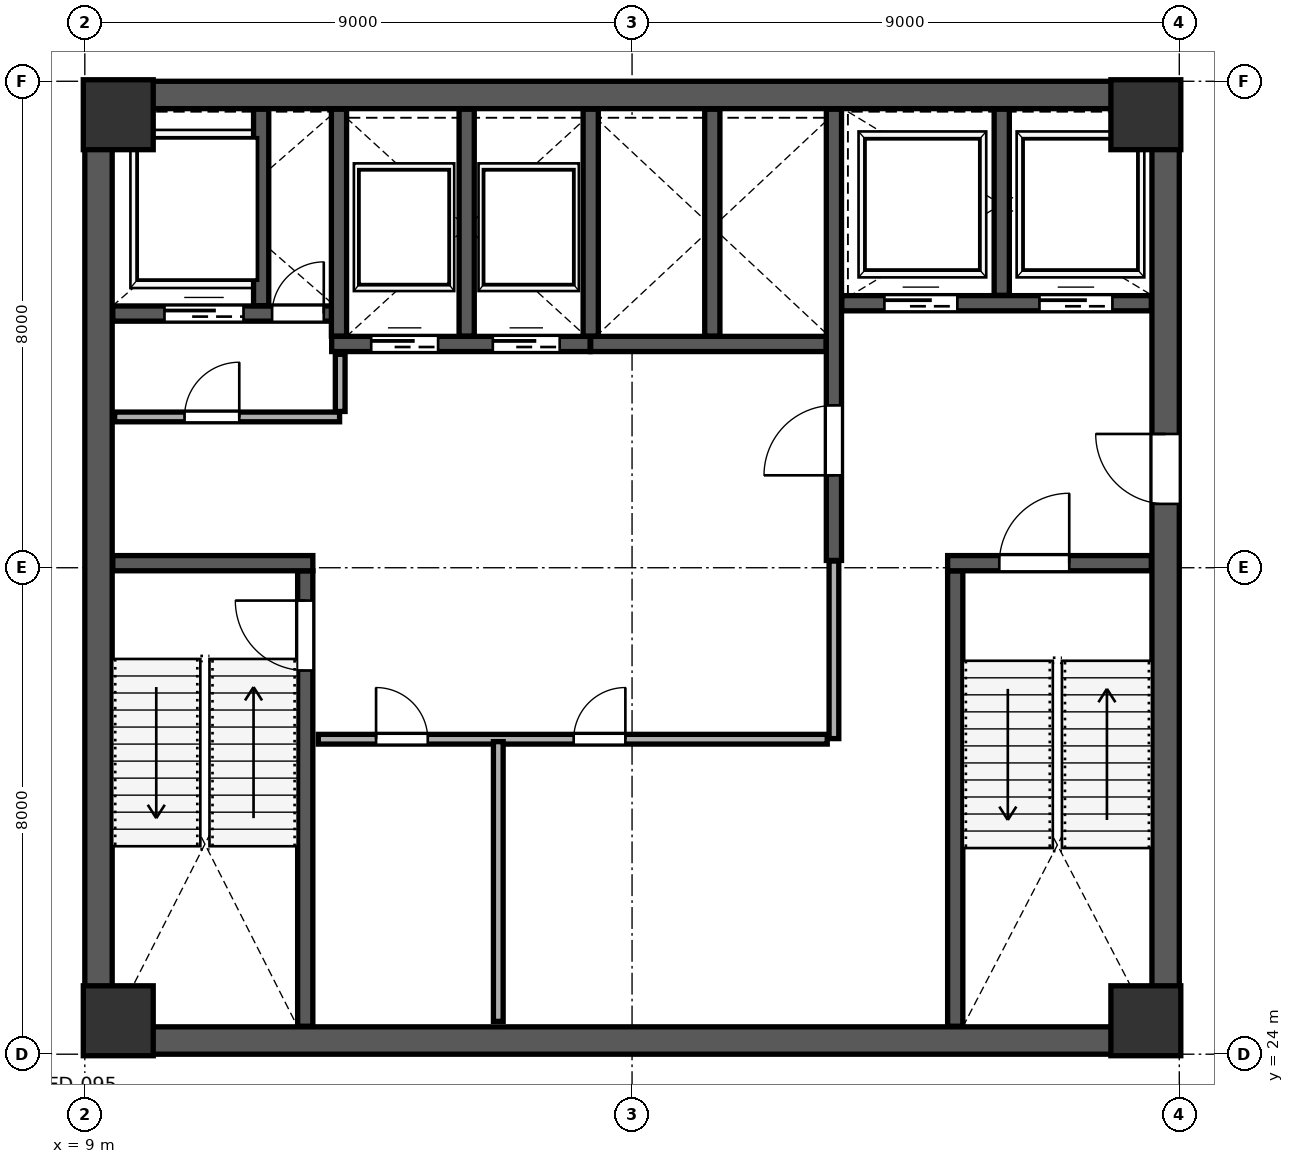
"""IFC4 building model, lengths in metres.
Left out: names, types, materials, properties, quantities, classifications, styles, units other than length and angle.
Written with IfcOpenShell. Run it as: python <this file> out.ifc"""

import sys

from ifc_helpers import new_model, si_unit, direction, frame, frame_2d, origin, origin_2d, place, context, subcontext, project, spatial, rectangle, extrude, source, transform, mapped, element, fill, save


model = new_model("IFC4")
c1 = context("Model", 3, precision=1e-05, world=origin(), true_north=direction((0.0, 1.0)))
c2 = subcontext(c1, "Body", "Model", "MODEL_VIEW")
j1 = project(units=[si_unit("LENGTHUNIT", "METRE"), si_unit("PLANEANGLEUNIT", "RADIAN")], contexts=[c1])
p1 = place(None, origin())
s1 = spatial("IfcSite", under=j1, at=p1, CompositionType="ELEMENT")
p2 = place(p1, origin())
s2 = spatial("IfcBuilding", under=s1, at=p2, CompositionType="ELEMENT")
p3 = place(p2, frame((0.0, 0.0, 154.0)))
s3 = spatial("IfcBuildingStorey", under=s2, at=p3, CompositionType="ELEMENT", Elevation=154.0)
m1 = source(origin(), c2, "Body", "SweptSolid", [
    extrude(rectangle(XDim=1.15, YDim=1.15, at=origin_2d()), origin(), (0.0, 0.0, 1.0), 4.198),
])
for number, where, z_axis, x_axis in (
    (1, (9.55, 24.55, 0.001), (0.0, 0.0, 1.0), (1.0, 0.0, 0.0)),
    (2, (26.45, 24.55, 0.001), (0.0, 0.0, 1.0), (1.0, 0.0, 0.0)),
    (3, (9.55, 39.45, 0.001), (0.0, 0.0, 1.0), (1.0, 0.0, 0.0)),
    (4, (26.45, 39.45, 0.001), (0.0, 0.0, 1.0), (1.0, 0.0, 0.0)),
):
    element("IfcColumn", number, at=place(p3, frame(where, z_axis=z_axis, x_axis=x_axis)), inside=s3, PredefinedType="COLUMN", context=c2, shape_type="MappedRepresentation", body=[
        mapped(m1, transform((0.0, 0.0, 0.0), scale=1.0)),
    ])
p4 = place(p3, frame((9.225, 24.45, 0.0), z_axis=(0.0, 0.0, 1.0), x_axis=(0.0, 1.0, 0.0)))
e5 = element("IfcWall", 5, at=p4, inside=s3, PredefinedType="SHEAR", context=c2, shape_type="SweptSolid", body=[
    extrude(rectangle(XDim=15.1, YDim=0.45, at=frame_2d((7.55, 0.0))), origin(), (0.0, 0.0, 1.0), 3.96),
])
p5 = place(p3, frame((26.775, 24.45, 0.0), z_axis=(0.0, 0.0, 1.0), x_axis=(0.0, 1.0, 0.0)))
e6 = element("IfcWall", 6, at=p5, inside=s3, PredefinedType="SHEAR", context=c2, shape_type="SweptSolid", body=[
    extrude(rectangle(XDim=15.1, YDim=0.45, at=frame_2d((7.55, 0.0))), origin(), (0.0, 0.0, 1.0), 3.96),
])
p6 = place(p5, frame((8.6, 0.0, 0.0)))
e7 = element("IfcOpeningElement", 7, at=p6, cuts=e6, PredefinedType="OPENING", context=c2, shape_type="SweptSolid", body=[
    extrude(rectangle(XDim=1.15, YDim=2.2, at=frame_2d((0.575, 1.1))), frame((0.0, 0.235, 0.0), z_axis=(0.0, -1.0, 0.0), x_axis=(1.0, 0.0, 0.0)), (0.0, 0.0, 1.0), 0.47),
])
for number, where, z_axis, x_axis in (
    (8, (9.0, 24.225, 0.0), (0.0, 0.0, 1.0), (1.0, 0.0, 0.0)),
    (9, (9.0, 39.775, 0.0), (0.0, 0.0, 1.0), (1.0, 0.0, 0.0)),
):
    element("IfcWall", number, at=place(p3, frame(where, z_axis=z_axis, x_axis=x_axis)), inside=s3, PredefinedType="SHEAR", context=c2, shape_type="SweptSolid", body=[
        extrude(rectangle(XDim=18.0, YDim=0.45, at=frame_2d((9.0, 0.0))), origin(), (0.0, 0.0, 1.0), 3.96),
    ])
p7 = place(p3, frame((12.625, 24.46, 0.0), z_axis=(0.0, 0.0, 1.0), x_axis=(0.0, 1.0, 0.0)))
e10 = element("IfcWall", 10, at=p7, inside=s3, PredefinedType="SHEAR", context=c2, shape_type="SweptSolid", body=[
    extrude(rectangle(XDim=7.49, YDim=0.25, at=frame_2d((3.745, 0.0))), origin(), (0.0, 0.0, 1.0), 3.96),
])
p8 = place(p7, frame((5.85, 0.0, 0.0)))
e11 = element("IfcOpeningElement", 11, at=p8, cuts=e10, PredefinedType="OPENING", context=c2, shape_type="SweptSolid", body=[
    extrude(rectangle(XDim=1.15, YDim=2.2, at=frame_2d((0.575, 1.1))), frame((0.0, 0.135, 0.0), z_axis=(0.0, -1.0, 0.0), x_axis=(1.0, 0.0, 0.0)), (0.0, 0.0, 1.0), 0.27),
])
p9 = place(p3, frame((9.46, 32.075, 0.0), z_axis=(0.0, 0.0, 1.0), x_axis=(1.0, 0.0, 0.0)))
e12 = element("IfcWall", 12, at=p9, inside=s3, PredefinedType="SHEAR", context=c2, shape_type="SweptSolid", body=[
    extrude(rectangle(XDim=3.29, YDim=0.25, at=frame_2d((1.645, 0.0))), origin(), (0.0, 0.0, 1.0), 3.96),
])
p10 = place(p3, frame((23.315, 24.46, 0.0), z_axis=(0.0, 0.0, 1.0), x_axis=(0.0, 1.0, 0.0)))
e13 = element("IfcWall", 13, at=p10, inside=s3, PredefinedType="SHEAR", context=c2, shape_type="SweptSolid", body=[
    extrude(rectangle(XDim=7.49, YDim=0.25, at=frame_2d((3.745, 0.0))), origin(), (0.0, 0.0, 1.0), 3.96),
])
p11 = place(p3, frame((23.19, 32.075, 0.0), z_axis=(0.0, 0.0, 1.0), x_axis=(1.0, 0.0, 0.0)))
e14 = element("IfcWall", 14, at=p11, inside=s3, PredefinedType="SHEAR", context=c2, shape_type="SweptSolid", body=[
    extrude(rectangle(XDim=3.35, YDim=0.25, at=frame_2d((1.675, 0.0))), origin(), (0.0, 0.0, 1.0), 3.96),
])
p12 = place(p11, frame((0.85, 0.0, 0.0)))
e15 = element("IfcOpeningElement", 15, at=p12, cuts=e14, PredefinedType="OPENING", context=c2, shape_type="SweptSolid", body=[
    extrude(rectangle(XDim=1.15, YDim=2.2, at=frame_2d((0.575, 1.1))), frame((0.0, 0.135, 0.0), z_axis=(0.0, -1.0, 0.0), x_axis=(1.0, 0.0, 0.0)), (0.0, 0.0, 1.0), 0.27),
])
p13 = place(p3, frame((21.32, 32.12, 0.0), z_axis=(0.0, 0.0, 1.0), x_axis=(0.0, 1.0, 0.0)))
e16 = element("IfcWall", 16, at=p13, inside=s3, PredefinedType="SHEAR", context=c2, shape_type="SweptSolid", body=[
    extrude(rectangle(XDim=7.42, YDim=0.25, at=frame_2d((3.71, 0.0))), origin(), (0.0, 0.0, 1.0), 3.96),
])
p14 = place(p13, frame((1.4, 0.0, 0.0)))
e17 = element("IfcOpeningElement", 17, at=p14, cuts=e16, PredefinedType="OPENING", context=c2, shape_type="SweptSolid", body=[
    extrude(rectangle(XDim=1.15, YDim=2.2, at=frame_2d((0.575, 1.1))), frame((0.0, 0.135, 0.0), z_axis=(0.0, -1.0, 0.0), x_axis=(1.0, 0.0, 0.0)), (0.0, 0.0, 1.0), 0.27),
])
p15 = place(p3, frame((9.46, 36.18, 0.0), z_axis=(0.0, 0.0, 1.0), x_axis=(1.0, 0.0, 0.0)))
e18 = element("IfcWall", 18, at=p15, inside=s3, PredefinedType="SHEAR", context=c2, shape_type="SweptSolid", body=[
    extrude(rectangle(XDim=3.79, YDim=0.25, at=frame_2d((1.895, 0.0))), origin(), (0.0, 0.0, 1.0), 3.96),
])
p16 = place(p15, frame((2.62, 0.0, 0.0)))
e19 = element("IfcOpeningElement", 19, at=p16, cuts=e18, PredefinedType="OPENING", context=c2, shape_type="SweptSolid", body=[
    extrude(rectangle(XDim=0.85, YDim=2.1, at=frame_2d((0.425, 1.05))), frame((0.0, 0.135, 0.0), z_axis=(0.0, -1.0, 0.0), x_axis=(1.0, 0.0, 0.0)), (0.0, 0.0, 1.0), 0.27),
])
p17 = place(p15, frame((0.85, 0.0, 0.0)))
e20 = element("IfcOpeningElement", 20, at=p17, cuts=e18, PredefinedType="OPENING", context=c2, shape_type="SweptSolid", body=[
    extrude(rectangle(XDim=1.3, YDim=2.25, at=frame_2d((0.65, 1.125))), frame((0.0, 0.135, 0.0), z_axis=(0.0, -1.0, 0.0), x_axis=(1.0, 0.0, 0.0)), (0.0, 0.0, 1.0), 0.27),
])
p18 = place(p3, frame((11.9, 36.31, 0.0), z_axis=(0.0, 0.0, 1.0), x_axis=(0.0, 1.0, 0.0)))
e21 = element("IfcWall", 21, at=p18, inside=s3, PredefinedType="SHEAR", context=c2, shape_type="SweptSolid", body=[
    extrude(rectangle(XDim=3.23, YDim=0.25, at=frame_2d((1.615, 0.0))), origin(), (0.0, 0.0, 1.0), 3.96),
])
p19 = place(p3, frame((21.45, 36.35, 0.0), z_axis=(0.0, 0.0, 1.0), x_axis=(1.0, 0.0, 0.0)))
e22 = element("IfcWall", 22, at=p19, inside=s3, PredefinedType="SHEAR", context=c2, shape_type="SweptSolid", body=[
    extrude(rectangle(XDim=5.09, YDim=0.25, at=frame_2d((2.545, 0.0))), origin(), (0.0, 0.0, 1.0), 3.96),
])
p20 = place(p19, frame((0.7, 0.0, 0.0)))
e23 = element("IfcOpeningElement", 23, at=p20, cuts=e22, PredefinedType="OPENING", context=c2, shape_type="SweptSolid", body=[
    extrude(rectangle(XDim=1.2, YDim=2.2, at=frame_2d((0.6, 1.1))), frame((0.0, 0.135, 0.0), z_axis=(0.0, -1.0, 0.0), x_axis=(1.0, 0.0, 0.0)), (0.0, 0.0, 1.0), 0.27),
])
p21 = place(p19, frame((3.25, 0.0, 0.0)))
e24 = element("IfcOpeningElement", 24, at=p21, cuts=e22, PredefinedType="OPENING", context=c2, shape_type="SweptSolid", body=[
    extrude(rectangle(XDim=1.2, YDim=2.2, at=frame_2d((0.6, 1.1))), frame((0.0, 0.135, 0.0), z_axis=(0.0, -1.0, 0.0), x_axis=(1.0, 0.0, 0.0)), (0.0, 0.0, 1.0), 0.27),
])
p22 = place(p3, frame((24.08, 36.48, 0.0), z_axis=(0.0, 0.0, 1.0), x_axis=(0.0, 1.0, 0.0)))
e25 = element("IfcWall", 25, at=p22, inside=s3, PredefinedType="SHEAR", context=c2, shape_type="SweptSolid", body=[
    extrude(rectangle(XDim=3.06, YDim=0.25, at=frame_2d((1.53, 0.0))), origin(), (0.0, 0.0, 1.0), 3.96),
])
p23 = place(p3, frame((13.06, 35.68, 0.0), z_axis=(0.0, 0.0, 1.0), x_axis=(1.0, 0.0, 0.0)))
e26 = element("IfcWall", 26, at=p23, inside=s3, PredefinedType="SHEAR", context=c2, shape_type="SweptSolid", body=[
    extrude(rectangle(XDim=4.25, YDim=0.25, at=frame_2d((2.125, 0.0))), origin(), (0.0, 0.0, 1.0), 3.96),
])
p24 = place(p23, frame((0.65, 0.0, 0.0)))
e27 = element("IfcOpeningElement", 27, at=p24, cuts=e26, PredefinedType="OPENING", context=c2, shape_type="SweptSolid", body=[
    extrude(rectangle(XDim=1.1, YDim=2.2, at=frame_2d((0.55, 1.1))), frame((0.0, 0.135, 0.0), z_axis=(0.0, -1.0, 0.0), x_axis=(1.0, 0.0, 0.0)), (0.0, 0.0, 1.0), 0.27),
])
p25 = place(p23, frame((2.65, 0.0, 0.0)))
e28 = element("IfcOpeningElement", 28, at=p25, cuts=e26, PredefinedType="OPENING", context=c2, shape_type="SweptSolid", body=[
    extrude(rectangle(XDim=1.1, YDim=2.2, at=frame_2d((0.55, 1.1))), frame((0.0, 0.135, 0.0), z_axis=(0.0, -1.0, 0.0), x_axis=(1.0, 0.0, 0.0)), (0.0, 0.0, 1.0), 0.27),
])
for number, where, z_axis, x_axis in (
    (29, (13.18, 35.81, 0.0), (0.0, 0.0, 1.0), (0.0, 1.0, 0.0)),
    (30, (15.28, 35.81, 0.0), (0.0, 0.0, 1.0), (0.0, 1.0, 0.0)),
):
    element("IfcWall", number, at=place(p3, frame(where, z_axis=z_axis, x_axis=x_axis)), inside=s3, PredefinedType="SHEAR", context=c2, shape_type="SweptSolid", body=[
        extrude(rectangle(XDim=3.73, YDim=0.25, at=frame_2d((1.865, 0.0))), origin(), (0.0, 0.0, 1.0), 3.96),
    ])
p26 = place(p3, frame((17.32, 35.68, 0.0), z_axis=(0.0, 0.0, 1.0), x_axis=(1.0, 0.0, 0.0)))
e31 = element("IfcWall", 31, at=p26, inside=s3, PredefinedType="SHEAR", context=c2, shape_type="SweptSolid", body=[
    extrude(rectangle(XDim=3.87, YDim=0.25, at=frame_2d((1.935, 0.0))), origin(), (0.0, 0.0, 1.0), 3.96),
])
for number, where, z_axis, x_axis in (
    (32, (17.32, 35.81, 0.0), (0.0, 0.0, 1.0), (0.0, 1.0, 0.0)),
    (33, (19.32, 35.81, 0.0), (0.0, 0.0, 1.0), (0.0, 1.0, 0.0)),
):
    element("IfcWall", number, at=place(p3, frame(where, z_axis=z_axis, x_axis=x_axis)), inside=s3, PredefinedType="SHEAR", context=c2, shape_type="SweptSolid", body=[
        extrude(rectangle(XDim=3.73, YDim=0.25, at=frame_2d((1.865, 0.0))), origin(), (0.0, 0.0, 1.0), 3.96),
    ])
p27 = place(p3, frame((9.49, 34.48, 0.0), z_axis=(0.0, 0.0, 1.0), x_axis=(1.0, 0.0, 0.0)))
e34 = element("IfcWall", 34, at=p27, inside=s3, PredefinedType="PARTITIONING", context=c2, shape_type="SweptSolid", body=[
    extrude(rectangle(XDim=3.7, YDim=0.16, at=frame_2d((1.85, 0.0))), origin(), (0.0, 0.0, 1.0), 3.96),
])
p28 = place(p27, frame((1.15, 0.0, 0.0)))
e35 = element("IfcOpeningElement", 35, at=p28, cuts=e34, PredefinedType="OPENING", context=c2, shape_type="SweptSolid", body=[
    extrude(rectangle(XDim=0.9, YDim=2.15, at=frame_2d((0.45, 1.075))), frame((0.0, 0.09, 0.0), z_axis=(0.0, -1.0, 0.0), x_axis=(1.0, 0.0, 0.0)), (0.0, 0.0, 1.0), 0.18),
])
p29 = place(p3, frame((13.2, 34.57, 0.0), z_axis=(0.0, 0.0, 1.0), x_axis=(0.0, 1.0, 0.0)))
e36 = element("IfcWall", 36, at=p29, inside=s3, PredefinedType="PARTITIONING", context=c2, shape_type="SweptSolid", body=[
    extrude(rectangle(XDim=0.94, YDim=0.16, at=frame_2d((0.47, 0.0))), origin(), (0.0, 0.0, 1.0), 3.96),
])
p30 = place(p3, frame((12.84, 29.18, 0.0), z_axis=(0.0, 0.0, 1.0), x_axis=(1.0, 0.0, 0.0)))
e37 = element("IfcWall", 37, at=p30, inside=s3, PredefinedType="PARTITIONING", context=c2, shape_type="SweptSolid", body=[
    extrude(rectangle(XDim=8.37, YDim=0.16, at=frame_2d((4.185, 0.0))), origin(), (0.0, 0.0, 1.0), 3.96),
])
p31 = place(p30, frame((0.95, 0.0, 0.0)))
e38 = element("IfcOpeningElement", 38, at=p31, cuts=e37, PredefinedType="OPENING", context=c2, shape_type="SweptSolid", body=[
    extrude(rectangle(XDim=0.85, YDim=2.1, at=frame_2d((0.425, 1.05))), frame((0.0, 0.09, 0.0), z_axis=(0.0, -1.0, 0.0), x_axis=(1.0, 0.0, 0.0)), (0.0, 0.0, 1.0), 0.18),
])
p32 = place(p30, frame((4.2, 0.0, 0.0)))
e39 = element("IfcOpeningElement", 39, at=p32, cuts=e37, PredefinedType="OPENING", context=c2, shape_type="SweptSolid", body=[
    extrude(rectangle(XDim=0.85, YDim=2.1, at=frame_2d((0.425, 1.05))), frame((0.0, 0.09, 0.0), z_axis=(0.0, -1.0, 0.0), x_axis=(1.0, 0.0, 0.0)), (0.0, 0.0, 1.0), 0.18),
])
p33 = place(p3, frame((15.8, 24.54, 0.0), z_axis=(0.0, 0.0, 1.0), x_axis=(0.0, 1.0, 0.0)))
e40 = element("IfcWall", 40, at=p33, inside=s3, PredefinedType="PARTITIONING", context=c2, shape_type="SweptSolid", body=[
    extrude(rectangle(XDim=4.6, YDim=0.16, at=frame_2d((2.3, 0.0))), origin(), (0.0, 0.0, 1.0), 3.96),
])
p34 = place(p3, frame((21.32, 29.19, 0.0), z_axis=(0.0, 0.0, 1.0), x_axis=(0.0, 1.0, 0.0)))
e41 = element("IfcWall", 41, at=p34, inside=s3, PredefinedType="PARTITIONING", context=c2, shape_type="SweptSolid", body=[
    extrude(rectangle(XDim=2.92, YDim=0.16, at=frame_2d((1.46, 0.0))), origin(), (0.0, 0.0, 1.0), 3.96),
])
p35 = place(p3, frame((11.673, 48.808, 0.0), z_axis=(0.0, 0.0, 1.0), x_axis=(0.906307085664, -0.422619765836, 0.0)))
e42 = element("IfcWall", 42, at=p35, inside=s3, PredefinedType="PARTITIONING", context=c2, shape_type="SweptSolid", body=[
    extrude(rectangle(XDim=26.31, YDim=0.135, at=frame_2d((13.155, 0.0))), origin(), (0.0, 0.0, 1.0), 3.96),
])
p36 = place(p35, frame((2.1, 0.0, 0.0)))
e43 = element("IfcOpeningElement", 43, at=p36, cuts=e42, PredefinedType="OPENING", context=c2, shape_type="SweptSolid", body=[
    extrude(rectangle(XDim=0.95, YDim=2.15, at=frame_2d((0.475, 1.075))), frame((0.0, 0.078, 0.0), z_axis=(0.0, -1.0, 0.0), x_axis=(1.0, 0.0, 0.0)), (0.0, 0.0, 1.0), 0.155),
])
p37 = place(p35, frame((18.2, 0.0, 0.0)))
e44 = element("IfcOpeningElement", 44, at=p37, cuts=e42, PredefinedType="OPENING", context=c2, shape_type="SweptSolid", body=[
    extrude(rectangle(XDim=0.95, YDim=2.15, at=frame_2d((0.475, 1.075))), frame((0.0, 0.078, 0.0), z_axis=(0.0, -1.0, 0.0), x_axis=(1.0, 0.0, 0.0)), (0.0, 0.0, 1.0), 0.155),
])
p38 = place(p3, frame((1.756, 27.635, 0.0), z_axis=(0.0, 0.0, 1.0), x_axis=(0.422615732035, 0.906308966653, 0.0)))
e45 = element("IfcWall", 45, at=p38, inside=s3, PredefinedType="PARTITIONING", context=c2, shape_type="SweptSolid", body=[
    extrude(rectangle(XDim=23.34, YDim=0.135, at=frame_2d((11.67, 0.0))), origin(), (0.0, 0.0, 1.0), 3.96),
])
p39 = place(p38, frame((1.3, 0.0, 0.0)))
e46 = element("IfcOpeningElement", 46, at=p39, cuts=e45, PredefinedType="OPENING", context=c2, shape_type="SweptSolid", body=[
    extrude(rectangle(XDim=0.95, YDim=2.15, at=frame_2d((0.475, 1.075))), frame((0.0, 0.078, 0.0), z_axis=(0.0, -1.0, 0.0), x_axis=(1.0, 0.0, 0.0)), (0.0, 0.0, 1.0), 0.155),
])
p40 = place(p38, frame((14.2, 0.0, 0.0)))
e47 = element("IfcOpeningElement", 47, at=p40, cuts=e45, PredefinedType="OPENING", context=c2, shape_type="SweptSolid", body=[
    extrude(rectangle(XDim=0.95, YDim=2.15, at=frame_2d((0.475, 1.075))), frame((0.0, 0.078, 0.0), z_axis=(0.0, -1.0, 0.0), x_axis=(1.0, 0.0, 0.0)), (0.0, 0.0, 1.0), 0.155),
])
p41 = place(p3, frame((23.256, 11.299, 0.0), z_axis=(0.0, 0.0, 1.0), x_axis=(0.422623489462, 0.906305349292, 0.0)))
e48 = element("IfcWall", 48, at=p41, inside=s3, PredefinedType="PARTITIONING", context=c2, shape_type="SweptSolid", body=[
    extrude(rectangle(XDim=21.48, YDim=0.16, at=frame_2d((10.74, 0.0))), origin(), (0.0, 0.0, 1.0), 3.96),
])
m2 = source(origin(), c2, "Body", "SweptSolid", [
    extrude(rectangle(XDim=1.15, YDim=2.2, at=frame_2d((0.575, 1.1))), frame((0.0, 0.025, 0.0), z_axis=(0.0, -1.0, 0.0), x_axis=(1.0, 0.0, 0.0)), (0.0, 0.0, 1.0), 0.05),
])
p42 = place(p8, origin())
e49 = element("IfcDoor", 49, at=p42, inside=s3, OperationType="SINGLE_SWING_RIGHT", PredefinedType="DOOR", context=c2, shape_type="MappedRepresentation", body=[
    mapped(m2, transform((0.0, 0.0, 0.0), scale=1.0)),
])
fill(e11, e49)
m3 = source(origin(), c2, "Body", "SweptSolid", [
    extrude(rectangle(XDim=1.15, YDim=2.2, at=frame_2d((0.575, 1.1))), frame((0.0, 0.025, 0.0), z_axis=(0.0, -1.0, 0.0), x_axis=(1.0, 0.0, 0.0)), (0.0, 0.0, 1.0), 0.05),
])
p43 = place(p14, origin())
e50 = element("IfcDoor", 50, at=p43, inside=s3, OperationType="SINGLE_SWING_LEFT", PredefinedType="DOOR", context=c2, shape_type="MappedRepresentation", body=[
    mapped(m3, transform((0.0, 0.0, 0.0), scale=1.0)),
])
fill(e17, e50)
p44 = place(p12, origin())
e51 = element("IfcDoor", 51, at=p44, inside=s3, OperationType="SINGLE_SWING_RIGHT", PredefinedType="DOOR", context=c2, shape_type="MappedRepresentation", body=[
    mapped(m2, transform((0.0, 0.0, 0.0), scale=1.0)),
])
fill(e15, e51)
p45 = place(p6, origin())
e52 = element("IfcDoor", 52, at=p45, inside=s3, OperationType="SINGLE_SWING_RIGHT", PredefinedType="DOOR", context=c2, shape_type="MappedRepresentation", body=[
    mapped(m3, transform((0.0, 0.0, 0.0), scale=1.0)),
])
fill(e7, e52)
m4 = source(origin(), c2, "Body", "SweptSolid", [
    extrude(rectangle(XDim=0.85, YDim=2.1, at=frame_2d((0.425, 1.05))), frame((0.0, 0.025, 0.0), z_axis=(0.0, -1.0, 0.0), x_axis=(1.0, 0.0, 0.0)), (0.0, 0.0, 1.0), 0.05),
])
p46 = place(p16, origin())
e53 = element("IfcDoor", 53, at=p46, inside=s3, OperationType="SINGLE_SWING_RIGHT", PredefinedType="DOOR", context=c2, shape_type="MappedRepresentation", body=[
    mapped(m4, transform((0.0, 0.0, 0.0), scale=1.0)),
])
fill(e19, e53)
m5 = source(origin(), c2, "Body", "SweptSolid", [
    extrude(rectangle(XDim=1.1, YDim=2.2, at=frame_2d((0.55, 1.1))), frame((0.0, 0.025, 0.0), z_axis=(0.0, -1.0, 0.0), x_axis=(1.0, 0.0, 0.0)), (0.0, 0.0, 1.0), 0.05),
])
p47 = place(p24, origin())
e54 = element("IfcDoor", 54, at=p47, inside=s3, OperationType="SLIDING_TO_LEFT", PredefinedType="DOOR", context=c2, shape_type="MappedRepresentation", body=[
    mapped(m5, transform((0.0, 0.0, 0.0), scale=1.0)),
])
fill(e27, e54)
p48 = place(p25, origin())
e55 = element("IfcDoor", 55, at=p48, inside=s3, OperationType="SLIDING_TO_RIGHT", PredefinedType="DOOR", context=c2, shape_type="MappedRepresentation", body=[
    mapped(m5, transform((0.0, 0.0, 0.0), scale=1.0)),
])
fill(e28, e55)
m6 = source(origin(), c2, "Body", "SweptSolid", [
    extrude(rectangle(XDim=1.2, YDim=2.2, at=frame_2d((0.6, 1.1))), frame((0.0, 0.025, 0.0), z_axis=(0.0, -1.0, 0.0), x_axis=(1.0, 0.0, 0.0)), (0.0, 0.0, 1.0), 0.05),
])
p49 = place(p20, origin())
e56 = element("IfcDoor", 56, at=p49, inside=s3, OperationType="SLIDING_TO_LEFT", PredefinedType="DOOR", context=c2, shape_type="MappedRepresentation", body=[
    mapped(m6, transform((0.0, 0.0, 0.0), scale=1.0)),
])
fill(e23, e56)
p50 = place(p21, origin())
e57 = element("IfcDoor", 57, at=p50, inside=s3, OperationType="SLIDING_TO_RIGHT", PredefinedType="DOOR", context=c2, shape_type="MappedRepresentation", body=[
    mapped(m6, transform((0.0, 0.0, 0.0), scale=1.0)),
])
fill(e24, e57)
m7 = source(origin(), c2, "Body", "SweptSolid", [
    extrude(rectangle(XDim=1.3, YDim=2.25, at=frame_2d((0.65, 1.125))), frame((0.0, 0.025, 0.0), z_axis=(0.0, -1.0, 0.0), x_axis=(1.0, 0.0, 0.0)), (0.0, 0.0, 1.0), 0.05),
])
p51 = place(p17, origin())
e58 = element("IfcDoor", 58, at=p51, inside=s3, OperationType="SLIDING_TO_LEFT", PredefinedType="DOOR", context=c2, shape_type="MappedRepresentation", body=[
    mapped(m7, transform((0.0, 0.0, 0.0), scale=1.0)),
])
fill(e20, e58)
m8 = source(origin(), c2, "Body", "SweptSolid", [
    extrude(rectangle(XDim=0.9, YDim=2.15, at=frame_2d((0.45, 1.075))), frame((0.0, 0.025, 0.0), z_axis=(0.0, -1.0, 0.0), x_axis=(1.0, 0.0, 0.0)), (0.0, 0.0, 1.0), 0.05),
])
p52 = place(p28, origin())
e59 = element("IfcDoor", 59, at=p52, inside=s3, OperationType="SINGLE_SWING_RIGHT", PredefinedType="DOOR", context=c2, shape_type="MappedRepresentation", body=[
    mapped(m8, transform((0.0, 0.0, 0.0), scale=1.0)),
])
fill(e35, e59)
p53 = place(p31, origin())
e60 = element("IfcDoor", 60, at=p53, inside=s3, OperationType="SINGLE_SWING_LEFT", PredefinedType="DOOR", context=c2, shape_type="MappedRepresentation", body=[
    mapped(m4, transform((0.0, 0.0, 0.0), scale=1.0)),
])
fill(e38, e60)
p54 = place(p32, origin())
e61 = element("IfcDoor", 61, at=p54, inside=s3, OperationType="SINGLE_SWING_RIGHT", PredefinedType="DOOR", context=c2, shape_type="MappedRepresentation", body=[
    mapped(m4, transform((0.0, 0.0, 0.0), scale=1.0)),
])
fill(e39, e61)
save(model, sys.argv[1])
